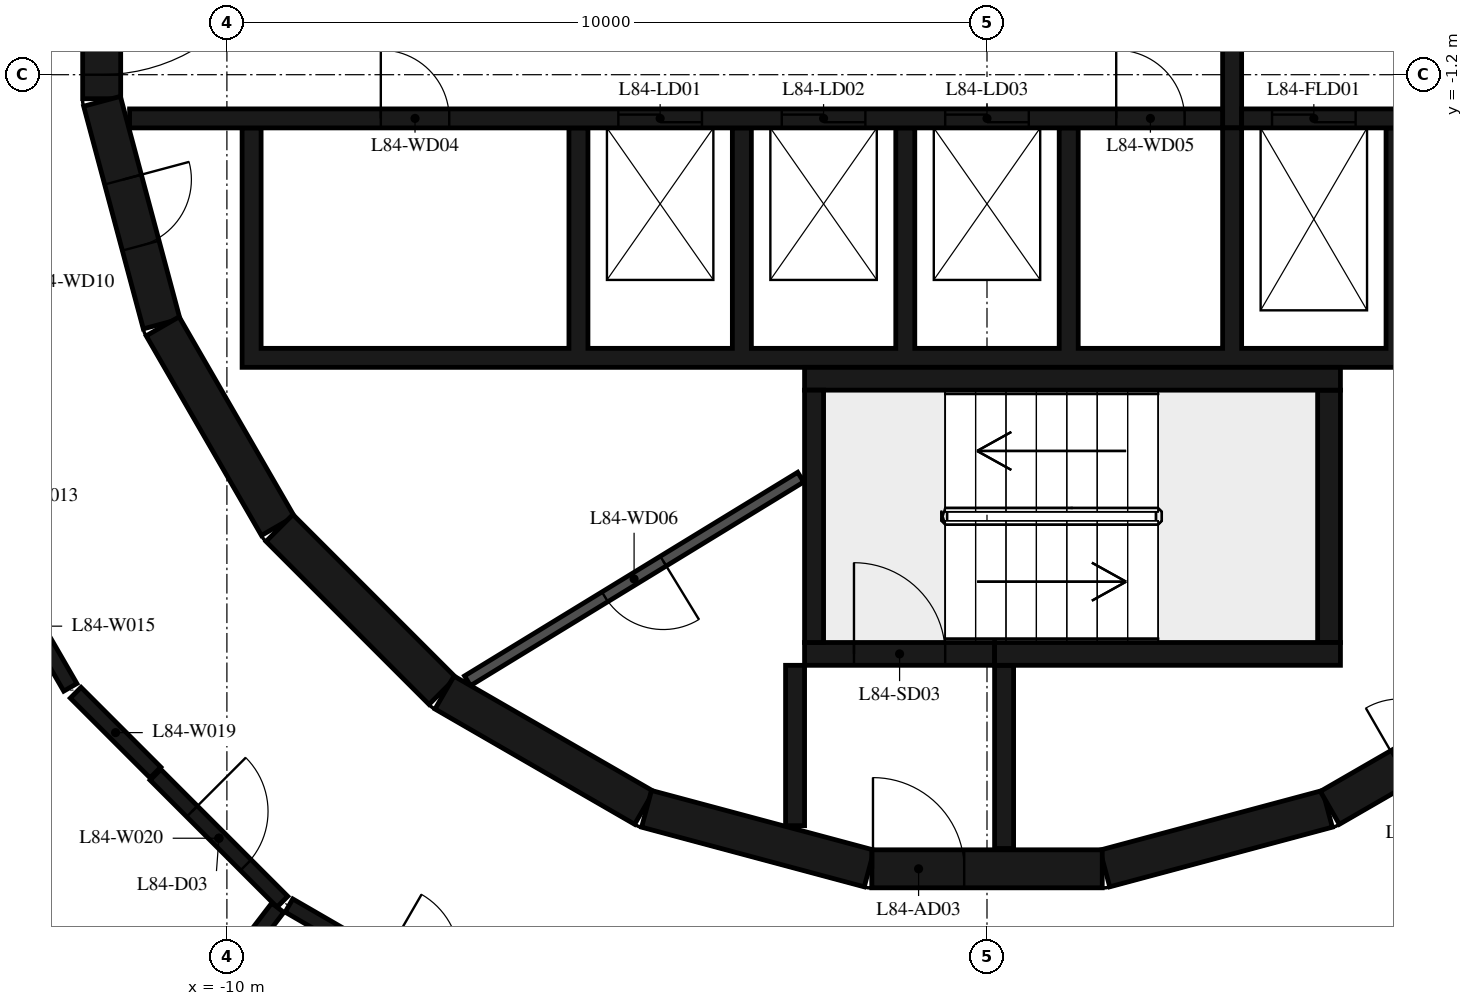
"""IFC4 building model, lengths in metres.
Left out: names, types, materials, properties, quantities, classifications, styles, units other than length and angle.
Written with IfcOpenShell. Run it as: python <this file> out.ifc"""

import sys

from ifc_helpers import new_model, si_unit, direction, frame, frame_2d, origin, place, context, subcontext, project, spatial, polyline, rectangle, outline, extrude, element, fill, save


model = new_model("IFC4")
c1 = context("Model", 3, precision=1e-05, world=origin(), true_north=direction((0.0, 1.0)))
c2 = subcontext(c1, "Body", "Model", "MODEL_VIEW")
j1 = project(units=[si_unit("LENGTHUNIT", "METRE"), si_unit("PLANEANGLEUNIT", "RADIAN")], contexts=[c1])
p1 = place(None, origin())
s1 = spatial("IfcSite", under=j1, at=p1, CompositionType="ELEMENT")
p2 = place(p1, origin())
s2 = spatial("IfcBuilding", under=s1, at=p2, CompositionType="ELEMENT")
p3 = place(p2, frame((0.0, 0.0, 326.2)))
s3 = spatial("IfcBuildingStorey", under=s2, at=p3, CompositionType="ELEMENT", Elevation=326.2)
p4 = place(p3, frame((1.55, -11.643, 0.0), z_axis=(0.0, 0.0, 1.0), x_axis=(0.965948410781, 0.258734743916, 0.0)))
e1 = element("IfcWall", 1, at=p4, inside=s3, PredefinedType="SHEAR", context=c2, shape_type="SweptSolid", body=[
    extrude(rectangle(XDim=3.033, YDim=0.5, at=frame_2d((1.516, 0.0))), origin(), (0.0, 0.0, 1.0), 6.35),
])
p5 = place(p3, frame((4.51, -10.845, 0.0), z_axis=(0.0, 0.0, 1.0), x_axis=(0.865975092491, 0.500087131594, 0.0)))
e2 = element("IfcWall", 2, at=p5, inside=s3, PredefinedType="SHEAR", context=c2, shape_type="SweptSolid", body=[
    extrude(rectangle(XDim=3.033, YDim=0.5, at=frame_2d((1.516, 0.0))), origin(), (0.0, 0.0, 1.0), 6.35),
])
p6 = place(p5, frame((1.066, 0.0, 0.0)))
e3 = element("IfcOpeningElement", 3, at=p6, cuts=e2, PredefinedType="OPENING", context=c2, shape_type="SweptSolid", body=[
    extrude(rectangle(XDim=0.9, YDim=2.1, at=frame_2d((0.45, 1.05))), frame((0.0, 0.26, 0.0), z_axis=(0.0, -1.0, 0.0), x_axis=(1.0, 0.0, 0.0)), (0.0, 0.0, 1.0), 0.52),
])
p7 = place(p3, frame((-11.647, 1.516, 0.0), z_axis=(0.0, 0.0, 1.0), x_axis=(0.0, -1.0, 0.0)))
e4 = element("IfcWall", 4, at=p7, inside=s3, PredefinedType="SHEAR", context=c2, shape_type="SweptSolid", body=[
    extrude(rectangle(XDim=3.033, YDim=0.5, at=frame_2d((1.516, 0.0))), origin(), (0.0, 0.0, 1.0), 6.35),
])
p8 = place(p7, frame((0.316, 0.0, 0.0)))
e5 = element("IfcOpeningElement", 5, at=p8, cuts=e4, PredefinedType="OPENING", context=c2, shape_type="SweptSolid", body=[
    extrude(rectangle(XDim=2.4, YDim=2.1, at=frame_2d((1.2, 1.05))), frame((0.0, 0.26, 0.0), z_axis=(0.0, -1.0, 0.0), x_axis=(1.0, 0.0, 0.0)), (0.0, 0.0, 1.0), 0.52),
])
p9 = place(p3, frame((-11.643, -1.55, 0.0), z_axis=(0.0, 0.0, 1.0), x_axis=(0.258734743916, -0.965948410781, 0.0)))
e6 = element("IfcWall", 6, at=p9, inside=s3, PredefinedType="SHEAR", context=c2, shape_type="SweptSolid", body=[
    extrude(rectangle(XDim=3.033, YDim=0.5, at=frame_2d((1.516, 0.0))), origin(), (0.0, 0.0, 1.0), 6.35),
])
p10 = place(p9, frame((1.066, 0.0, 0.0)))
e7 = element("IfcOpeningElement", 7, at=p10, cuts=e6, PredefinedType="OPENING", context=c2, shape_type="SweptSolid", body=[
    extrude(rectangle(XDim=0.9, YDim=2.1, at=frame_2d((0.45, 1.05))), frame((0.0, 0.26, 0.0), z_axis=(0.0, -1.0, 0.0), x_axis=(1.0, 0.0, 0.0)), (0.0, 0.0, 1.0), 0.52),
])
p11 = place(p3, frame((-10.845, -4.51, 0.0), z_axis=(0.0, 0.0, 1.0), x_axis=(0.500087131594, -0.865975092491, 0.0)))
e8 = element("IfcWall", 8, at=p11, inside=s3, PredefinedType="SHEAR", context=c2, shape_type="SweptSolid", body=[
    extrude(rectangle(XDim=3.033, YDim=0.5, at=frame_2d((1.516, 0.0))), origin(), (0.0, 0.0, 1.0), 6.35),
])
p12 = place(p3, frame((-9.308, -7.164, 0.0), z_axis=(0.0, 0.0, 1.0), x_axis=(0.707106781187, -0.707106781187, 0.0)))
e9 = element("IfcWall", 9, at=p12, inside=s3, PredefinedType="SHEAR", context=c2, shape_type="SweptSolid", body=[
    extrude(rectangle(XDim=3.032, YDim=0.5, at=frame_2d((1.516, 0.0))), origin(), (0.0, 0.0, 1.0), 6.35),
])
for number, where, z_axis, x_axis in (
    (10, (-7.137, -9.329, 0.0), (0.0, 0.0, 1.0), (0.866, -0.5, 0.0)),
    (11, (-4.479, -10.858, 0.0), (0.0, 0.0, 1.0), (0.966, -0.259, 0.0)),
):
    element("IfcWall", number, at=place(p3, frame(where, z_axis=z_axis, x_axis=x_axis)), inside=s3, PredefinedType="SHEAR", context=c2, shape_type="SweptSolid", body=[
        extrude(rectangle(XDim=3.033, YDim=0.5, at=frame_2d((1.516, 0.0))), origin(), (0.0, 0.0, 1.0), 6.35),
    ])
p13 = place(p3, frame((-1.516, -11.647, 0.0), z_axis=(0.0, 0.0, 1.0), x_axis=(1.0, 0.0, 0.0)))
e12 = element("IfcWall", 12, at=p13, inside=s3, PredefinedType="SHEAR", context=c2, shape_type="SweptSolid", body=[
    extrude(rectangle(XDim=3.033, YDim=0.5, at=frame_2d((1.516, 0.0))), origin(), (0.0, 0.0, 1.0), 6.35),
])
p14 = place(p13, frame((0.016, 0.0, 0.0)))
e13 = element("IfcOpeningElement", 13, at=p14, cuts=e12, PredefinedType="OPENING", context=c2, shape_type="SweptSolid", body=[
    extrude(rectangle(XDim=1.2, YDim=2.1, at=frame_2d((0.6, 1.05))), frame((0.0, 0.26, 0.0), z_axis=(0.0, -1.0, 0.0), x_axis=(1.0, 0.0, 0.0)), (0.0, 0.0, 1.0), 0.52),
])
p15 = place(p3, frame((-2.275, -8.67, 0.0), z_axis=(0.0, 0.0, 1.0), x_axis=(0.0, 1.0, 0.0)))
e14 = element("IfcWall", 14, at=p15, inside=s3, PredefinedType="SHEAR", context=c2, shape_type="SweptSolid", body=[
    extrude(rectangle(XDim=3.32, YDim=0.25, at=frame_2d((1.66, 0.0))), origin(), (0.0, 0.0, 1.0), 6.35),
])
p16 = place(p3, frame((-2.4, -5.2, 0.0), z_axis=(0.0, 0.0, 1.0), x_axis=(1.0, 0.0, 0.0)))
e15 = element("IfcWall", 15, at=p16, inside=s3, PredefinedType="SHEAR", context=c2, shape_type="SweptSolid", body=[
    extrude(rectangle(XDim=7.05, YDim=0.3, at=frame_2d((3.525, 0.0))), origin(), (0.0, 0.0, 1.0), 6.35),
])
p17 = place(p3, frame((4.5, -8.67, 0.0), z_axis=(0.0, 0.0, 1.0), x_axis=(0.0, 1.0, 0.0)))
e16 = element("IfcWall", 16, at=p17, inside=s3, PredefinedType="SHEAR", context=c2, shape_type="SweptSolid", body=[
    extrude(rectangle(XDim=3.32, YDim=0.3, at=frame_2d((1.66, 0.0))), origin(), (0.0, 0.0, 1.0), 6.35),
])
p18 = place(p3, frame((0.1, -8.82, 0.0), z_axis=(0.0, 0.0, 1.0), x_axis=(1.0, 0.0, 0.0)))
e17 = element("IfcWall", 17, at=p18, inside=s3, PredefinedType="SHEAR", context=c2, shape_type="SweptSolid", body=[
    extrude(rectangle(XDim=4.55, YDim=0.3, at=frame_2d((2.275, 0.0))), origin(), (0.0, 0.0, 1.0), 6.35),
])
p19 = place(p3, frame((-2.4, -8.82, 0.0), z_axis=(0.0, 0.0, 1.0), x_axis=(1.0, 0.0, 0.0)))
e18 = element("IfcWall", 18, at=p19, inside=s3, PredefinedType="SHEAR", context=c2, shape_type="SweptSolid", body=[
    extrude(rectangle(XDim=2.5, YDim=0.3, at=frame_2d((1.25, 0.0))), origin(), (0.0, 0.0, 1.0), 6.35),
])
p20 = place(p19, frame((0.65, 0.0, 0.0)))
e19 = element("IfcOpeningElement", 19, at=p20, cuts=e18, PredefinedType="OPENING", context=c2, shape_type="SweptSolid", body=[
    extrude(rectangle(XDim=1.2, YDim=2.1, at=frame_2d((0.6, 1.05))), frame((0.0, 0.16, 0.0), z_axis=(0.0, -1.0, 0.0), x_axis=(1.0, 0.0, 0.0)), (0.0, 0.0, 1.0), 0.32),
])
p21 = place(p3, frame((-2.525, -8.97, 0.0), z_axis=(0.0, 0.0, 1.0), x_axis=(0.0, -1.0, 0.0)))
e20 = element("IfcWall", 20, at=p21, inside=s3, PredefinedType="SHEAR", context=c2, shape_type="SweptSolid", body=[
    extrude(rectangle(XDim=2.11, YDim=0.25, at=frame_2d((1.055, 0.0))), origin(), (0.0, 0.0, 1.0), 6.35),
])
p22 = place(p3, frame((0.225, -8.97, 0.0), z_axis=(0.0, 0.0, 1.0), x_axis=(0.0, -1.0, 0.0)))
e21 = element("IfcWall", 21, at=p22, inside=s3, PredefinedType="SHEAR", context=c2, shape_type="SweptSolid", body=[
    extrude(rectangle(XDim=2.41, YDim=0.25, at=frame_2d((1.205, 0.0))), origin(), (0.0, 0.0, 1.0), 6.35),
])
p23 = place(p3, origin())
e22 = element("IfcWall", 22, at=p23, inside=s3, PredefinedType="SHEAR", context=c2, shape_type="SweptSolid", body=[
    extrude(outline(polyline([(9.8, -5.05), (9.8, -4.8), (9.8, -1.9), (9.55, -1.9), (9.55, -4.8), (7.65, -4.8), (7.65, -1.9), (7.4, -1.9), (7.4, -4.8), (5.5, -4.8), (5.5, -1.9), (5.25, -1.9), (5.25, -4.8), (3.35, -4.8), (3.35, -1.9), (3.1, -1.9), (3.1, -4.8), (1.2, -4.8), (1.2, -1.9), (0.95, -1.9), (0.95, -4.8), (-0.95, -4.8), (-0.95, -1.9), (-1.2, -1.9), (-1.2, -4.8), (-3.1, -4.8), (-3.1, -1.9), (-3.35, -1.9), (-3.35, -4.8), (-5.25, -4.8), (-5.25, -1.9), (-5.5, -1.9), (-5.5, -4.8), (-9.55, -4.8), (-9.55, -1.9), (-9.8, -1.9), (-9.8, -4.8), (-9.8, -5.05), (9.8, -5.05)])), origin(), (0.0, 0.0, 1.0), 6.35),
])
p24 = place(p3, frame((-11.28, -1.775, 0.0), z_axis=(0.0, 0.0, 1.0), x_axis=(1.0, 0.0, 0.0)))
e23 = element("IfcWall", 23, at=p24, inside=s3, PredefinedType="SHEAR", context=c2, shape_type="SweptSolid", body=[
    extrude(rectangle(XDim=14.38, YDim=0.25, at=frame_2d((7.19, 0.0))), origin(), (0.0, 0.0, 1.0), 6.35),
])
p25 = place(p24, frame((6.43, 0.0, 0.0)))
e24 = element("IfcOpeningElement", 24, at=p25, cuts=e23, PredefinedType="OPENING", context=c2, shape_type="SweptSolid", body=[
    extrude(rectangle(XDim=1.1, YDim=2.1, at=frame_2d((0.55, 1.05))), frame((0.0, 0.135, 0.0), z_axis=(0.0, -1.0, 0.0), x_axis=(1.0, 0.0, 0.0)), (0.0, 0.0, 1.0), 0.27),
])
p26 = place(p24, frame((8.58, 0.0, 0.0)))
e25 = element("IfcOpeningElement", 25, at=p26, cuts=e23, PredefinedType="OPENING", context=c2, shape_type="SweptSolid", body=[
    extrude(rectangle(XDim=1.1, YDim=2.1, at=frame_2d((0.55, 1.05))), frame((0.0, 0.135, 0.0), z_axis=(0.0, -1.0, 0.0), x_axis=(1.0, 0.0, 0.0)), (0.0, 0.0, 1.0), 0.27),
])
p27 = place(p24, frame((10.73, 0.0, 0.0)))
e26 = element("IfcOpeningElement", 26, at=p27, cuts=e23, PredefinedType="OPENING", context=c2, shape_type="SweptSolid", body=[
    extrude(rectangle(XDim=1.1, YDim=2.1, at=frame_2d((0.55, 1.05))), frame((0.0, 0.135, 0.0), z_axis=(0.0, -1.0, 0.0), x_axis=(1.0, 0.0, 0.0)), (0.0, 0.0, 1.0), 0.27),
])
p28 = place(p24, frame((3.305, 0.0, 0.0)))
e27 = element("IfcOpeningElement", 27, at=p28, cuts=e23, PredefinedType="OPENING", context=c2, shape_type="SweptSolid", body=[
    extrude(rectangle(XDim=0.9, YDim=2.1, at=frame_2d((0.45, 1.05))), frame((0.0, 0.135, 0.0), z_axis=(0.0, -1.0, 0.0), x_axis=(1.0, 0.0, 0.0)), (0.0, 0.0, 1.0), 0.27),
])
p29 = place(p24, frame((12.98, 0.0, 0.0)))
e28 = element("IfcOpeningElement", 28, at=p29, cuts=e23, PredefinedType="OPENING", context=c2, shape_type="SweptSolid", body=[
    extrude(rectangle(XDim=0.9, YDim=2.1, at=frame_2d((0.45, 1.05))), frame((0.0, 0.135, 0.0), z_axis=(0.0, -1.0, 0.0), x_axis=(1.0, 0.0, 0.0)), (0.0, 0.0, 1.0), 0.27),
])
p30 = place(p3, frame((3.35, -1.775, 0.0), z_axis=(0.0, 0.0, 1.0), x_axis=(1.0, 0.0, 0.0)))
e29 = element("IfcWall", 29, at=p30, inside=s3, PredefinedType="SHEAR", context=c2, shape_type="SweptSolid", body=[
    extrude(rectangle(XDim=7.93, YDim=0.25, at=frame_2d((3.965, 0.0))), origin(), (0.0, 0.0, 1.0), 6.35),
])
p31 = place(p30, frame((0.4, 0.0, 0.0)))
e30 = element("IfcOpeningElement", 30, at=p31, cuts=e29, PredefinedType="OPENING", context=c2, shape_type="SweptSolid", body=[
    extrude(rectangle(XDim=1.1, YDim=2.4, at=frame_2d((0.55, 1.2))), frame((0.0, 0.135, 0.0), z_axis=(0.0, -1.0, 0.0), x_axis=(1.0, 0.0, 0.0)), (0.0, 0.0, 1.0), 0.27),
])
p32 = place(p30, frame((2.55, 0.0, 0.0)))
e31 = element("IfcOpeningElement", 31, at=p32, cuts=e29, PredefinedType="OPENING", context=c2, shape_type="SweptSolid", body=[
    extrude(rectangle(XDim=1.1, YDim=2.4, at=frame_2d((0.55, 1.2))), frame((0.0, 0.135, 0.0), z_axis=(0.0, -1.0, 0.0), x_axis=(1.0, 0.0, 0.0)), (0.0, 0.0, 1.0), 0.27),
])
p33 = place(p30, frame((4.7, 0.0, 0.0)))
e32 = element("IfcOpeningElement", 32, at=p33, cuts=e29, PredefinedType="OPENING", context=c2, shape_type="SweptSolid", body=[
    extrude(rectangle(XDim=1.1, YDim=2.4, at=frame_2d((0.55, 1.2))), frame((0.0, 0.135, 0.0), z_axis=(0.0, -1.0, 0.0), x_axis=(1.0, 0.0, 0.0)), (0.0, 0.0, 1.0), 0.27),
])
p34 = place(p3, frame((3.225, -1.9, 0.0), z_axis=(0.0, 0.0, 1.0), x_axis=(0.0, 1.0, 0.0)))
e33 = element("IfcWall", 33, at=p34, inside=s3, PredefinedType="SHEAR", context=c2, shape_type="SweptSolid", body=[
    extrude(rectangle(XDim=3.8, YDim=0.25, at=frame_2d((1.9, 0.0))), origin(), (0.0, 0.0, 1.0), 6.35),
])
p35 = place(p3, frame((-2.451, -6.495, 0.0), z_axis=(0.0, 0.0, 1.0), x_axis=(-0.853250115418, -0.521501908471, 0.0)))
e34 = element("IfcWall", 34, at=p35, inside=s3, PredefinedType="PARTITIONING", context=c2, shape_type="SweptSolid", body=[
    extrude(rectangle(XDim=5.137, YDim=0.15, at=frame_2d((2.569, 0.0))), origin(), (0.0, 0.0, 1.0), 6.35),
])
p36 = place(p35, frame((2.119, 0.0, 0.0)))
e35 = element("IfcOpeningElement", 35, at=p36, cuts=e34, PredefinedType="OPENING", context=c2, shape_type="SweptSolid", body=[
    extrude(rectangle(XDim=0.9, YDim=2.1, at=frame_2d((0.45, 1.05))), frame((0.0, 0.085, 0.0), z_axis=(0.0, -1.0, 0.0), x_axis=(1.0, 0.0, 0.0)), (0.0, 0.0, 1.0), 0.17),
])
p37 = place(p3, frame((-12.99, -7.65, 0.0), z_axis=(0.0, 0.0, 1.0), x_axis=(0.50013539823, -0.865947217466, 0.0)))
e36 = element("IfcWall", 36, at=p37, inside=s3, PredefinedType="PARTITIONING", context=c2, shape_type="SweptSolid", body=[
    extrude(rectangle(XDim=1.859, YDim=0.2, at=frame_2d((0.93, 0.0))), origin(), (0.0, 0.0, 1.0), 6.35),
])
p38 = place(p3, frame((-11.989, -9.331, 0.0), z_axis=(0.0, 0.0, 1.0), x_axis=(0.70718904595, -0.707024506851, 0.0)))
e37 = element("IfcWall", 37, at=p38, inside=s3, PredefinedType="PARTITIONING", context=c2, shape_type="SweptSolid", body=[
    extrude(rectangle(XDim=1.484, YDim=0.2, at=frame_2d((0.742, 0.0))), origin(), (0.0, 0.0, 1.0), 6.35),
])
p39 = place(p3, frame((-10.94, -10.41, 0.0), z_axis=(0.0, 0.0, 1.0), x_axis=(0.707055093984, -0.707158464611, 0.0)))
e38 = element("IfcWall", 38, at=p39, inside=s3, PredefinedType="PARTITIONING", context=c2, shape_type="SweptSolid", body=[
    extrude(rectangle(XDim=2.362, YDim=0.2, at=frame_2d((1.181, 0.0))), origin(), (0.0, 0.0, 1.0), 6.35),
])
p40 = place(p39, frame((0.681, 0.0, 0.0)))
e39 = element("IfcOpeningElement", 39, at=p40, cuts=e38, PredefinedType="OPENING", context=c2, shape_type="SweptSolid", body=[
    extrude(rectangle(XDim=1.0, YDim=2.1, at=frame_2d((0.5, 1.05))), frame((0.0, 0.11, 0.0), z_axis=(0.0, -1.0, 0.0), x_axis=(1.0, 0.0, 0.0)), (0.0, 0.0, 1.0), 0.22),
])
p41 = place(p3, frame((-9.331, -12.159, 0.0), z_axis=(0.0, 0.0, 1.0), x_axis=(-0.608409918623, -0.793622940017, 0.0)))
e40 = element("IfcWall", 40, at=p41, inside=s3, PredefinedType="PARTITIONING", context=c2, shape_type="SweptSolid", body=[
    extrude(rectangle(XDim=6.162, YDim=0.2, at=frame_2d((3.081, 0.0))), origin(), (0.0, 0.0, 1.0), 6.35),
])
p42 = place(p3, frame((-9.183, -12.13, 0.0), z_axis=(0.0, 0.0, 1.0), x_axis=(0.865585884642, -0.500760497952, 0.0)))
e41 = element("IfcWall", 41, at=p42, inside=s3, PredefinedType="PARTITIONING", context=c2, shape_type="SweptSolid", body=[
    extrude(rectangle(XDim=3.874, YDim=0.2, at=frame_2d((1.937, 0.0))), origin(), (0.0, 0.0, 1.0), 6.35),
])
p43 = place(p42, frame((1.437, 0.0, 0.0)))
e42 = element("IfcOpeningElement", 42, at=p43, cuts=e41, PredefinedType="OPENING", context=c2, shape_type="SweptSolid", body=[
    extrude(rectangle(XDim=1.0, YDim=2.1, at=frame_2d((0.5, 1.05))), frame((0.0, 0.11, 0.0), z_axis=(0.0, -1.0, 0.0), x_axis=(1.0, 0.0, 0.0)), (0.0, 0.0, 1.0), 0.22),
])
p44 = place(p20, origin())
e43 = element("IfcDoor", 43, at=p44, inside=s3, OperationType="SINGLE_SWING_LEFT", PredefinedType="DOOR", context=c2, shape_type="SweptSolid", body=[
    extrude(rectangle(XDim=1.2, YDim=2.1, at=frame_2d((0.6, 1.05))), frame((0.0, 0.025, 0.0), z_axis=(0.0, -1.0, 0.0), x_axis=(1.0, 0.0, 0.0)), (0.0, 0.0, 1.0), 0.05),
])
fill(e19, e43)
p45 = place(p14, origin())
e44 = element("IfcDoor", 44, at=p45, inside=s3, OperationType="SINGLE_SWING_RIGHT", PredefinedType="DOOR", context=c2, shape_type="SweptSolid", body=[
    extrude(rectangle(XDim=1.2, YDim=2.1, at=frame_2d((0.6, 1.05))), frame((0.0, 0.025, 0.0), z_axis=(0.0, -1.0, 0.0), x_axis=(1.0, 0.0, 0.0)), (0.0, 0.0, 1.0), 0.05),
])
fill(e13, e44)
p46 = place(p8, origin())
e45 = element("IfcDoor", 45, at=p46, inside=s3, OperationType="DOUBLE_DOOR_SINGLE_SWING", PredefinedType="DOOR", context=c2, shape_type="SweptSolid", body=[
    extrude(rectangle(XDim=2.4, YDim=2.1, at=frame_2d((1.2, 1.05))), frame((0.0, 0.025, 0.0), z_axis=(0.0, -1.0, 0.0), x_axis=(1.0, 0.0, 0.0)), (0.0, 0.0, 1.0), 0.05),
])
fill(e5, e45)
p47 = place(p25, origin())
e46 = element("IfcDoor", 46, at=p47, inside=s3, OperationType="DOUBLE_DOOR_SLIDING", PredefinedType="DOOR", context=c2, shape_type="SweptSolid", body=[
    extrude(rectangle(XDim=1.1, YDim=2.1, at=frame_2d((0.55, 1.05))), frame((0.0, 0.025, 0.0), z_axis=(0.0, -1.0, 0.0), x_axis=(1.0, 0.0, 0.0)), (0.0, 0.0, 1.0), 0.05),
])
fill(e24, e46)
p48 = place(p26, origin())
e47 = element("IfcDoor", 47, at=p48, inside=s3, OperationType="DOUBLE_DOOR_SLIDING", PredefinedType="DOOR", context=c2, shape_type="SweptSolid", body=[
    extrude(rectangle(XDim=1.1, YDim=2.1, at=frame_2d((0.55, 1.05))), frame((0.0, 0.025, 0.0), z_axis=(0.0, -1.0, 0.0), x_axis=(1.0, 0.0, 0.0)), (0.0, 0.0, 1.0), 0.05),
])
fill(e25, e47)
p49 = place(p27, origin())
e48 = element("IfcDoor", 48, at=p49, inside=s3, OperationType="DOUBLE_DOOR_SLIDING", PredefinedType="DOOR", context=c2, shape_type="SweptSolid", body=[
    extrude(rectangle(XDim=1.1, YDim=2.1, at=frame_2d((0.55, 1.05))), frame((0.0, 0.025, 0.0), z_axis=(0.0, -1.0, 0.0), x_axis=(1.0, 0.0, 0.0)), (0.0, 0.0, 1.0), 0.05),
])
fill(e26, e48)
p50 = place(p31, origin())
e49 = element("IfcDoor", 49, at=p50, inside=s3, OperationType="DOUBLE_DOOR_SLIDING", PredefinedType="DOOR", context=c2, shape_type="SweptSolid", body=[
    extrude(rectangle(XDim=1.1, YDim=2.4, at=frame_2d((0.55, 1.2))), frame((0.0, 0.025, 0.0), z_axis=(0.0, -1.0, 0.0), x_axis=(1.0, 0.0, 0.0)), (0.0, 0.0, 1.0), 0.05),
])
fill(e30, e49)
p51 = place(p28, origin())
e50 = element("IfcDoor", 50, at=p51, inside=s3, OperationType="SINGLE_SWING_RIGHT", PredefinedType="DOOR", context=c2, shape_type="SweptSolid", body=[
    extrude(rectangle(XDim=0.9, YDim=2.1, at=frame_2d((0.45, 1.05))), frame((0.0, 0.025, 0.0), z_axis=(0.0, -1.0, 0.0), x_axis=(1.0, 0.0, 0.0)), (0.0, 0.0, 1.0), 0.05),
])
fill(e27, e50)
p52 = place(p29, origin())
e51 = element("IfcDoor", 51, at=p52, inside=s3, OperationType="SINGLE_SWING_LEFT", PredefinedType="DOOR", context=c2, shape_type="SweptSolid", body=[
    extrude(rectangle(XDim=0.9, YDim=2.1, at=frame_2d((0.45, 1.05))), frame((0.0, 0.025, 0.0), z_axis=(0.0, -1.0, 0.0), x_axis=(1.0, 0.0, 0.0)), (0.0, 0.0, 1.0), 0.05),
])
fill(e28, e51)
p53 = place(p36, origin())
e52 = element("IfcDoor", 52, at=p53, inside=s3, OperationType="SINGLE_SWING_RIGHT", PredefinedType="DOOR", context=c2, shape_type="SweptSolid", body=[
    extrude(rectangle(XDim=0.9, YDim=2.1, at=frame_2d((0.45, 1.05))), frame((0.0, 0.025, 0.0), z_axis=(0.0, -1.0, 0.0), x_axis=(1.0, 0.0, 0.0)), (0.0, 0.0, 1.0), 0.05),
])
fill(e35, e52)
p54 = place(p10, origin())
e53 = element("IfcDoor", 53, at=p54, inside=s3, OperationType="SINGLE_SWING_RIGHT", PredefinedType="DOOR", context=c2, shape_type="SweptSolid", body=[
    extrude(rectangle(XDim=0.9, YDim=2.1, at=frame_2d((0.45, 1.05))), frame((0.0, 0.025, 0.0), z_axis=(0.0, -1.0, 0.0), x_axis=(1.0, 0.0, 0.0)), (0.0, 0.0, 1.0), 0.05),
])
fill(e7, e53)
p55 = place(p40, origin())
e54 = element("IfcDoor", 54, at=p55, inside=s3, OperationType="SINGLE_SWING_LEFT", PredefinedType="DOOR", context=c2, shape_type="SweptSolid", body=[
    extrude(rectangle(XDim=1.0, YDim=2.1, at=frame_2d((0.5, 1.05))), frame((0.0, 0.025, 0.0), z_axis=(0.0, -1.0, 0.0), x_axis=(1.0, 0.0, 0.0)), (0.0, 0.0, 1.0), 0.05),
])
fill(e39, e54)
save(model, sys.argv[1])
